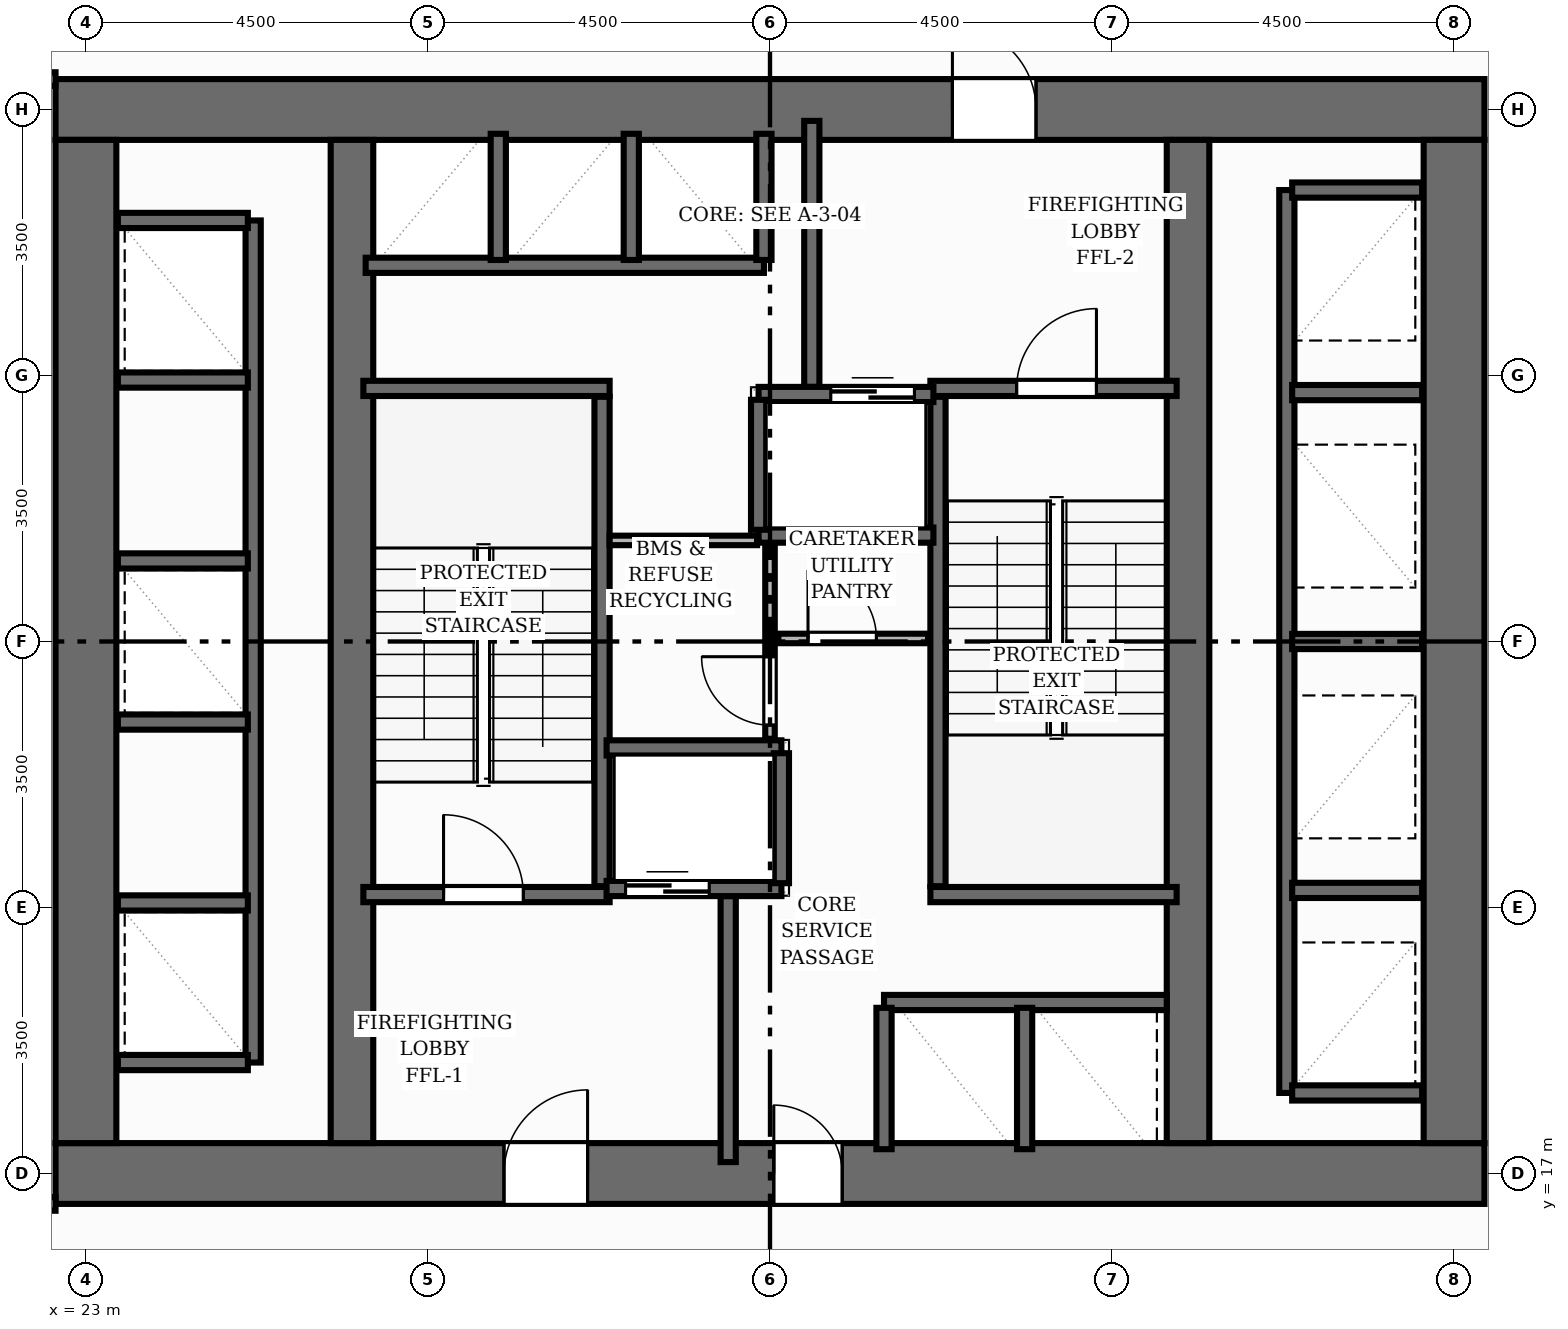
"""IFC4 building model, lengths in metres.
Left out: names, types, materials, properties, quantities, classifications, styles, units other than length and angle.
Written with IfcOpenShell. Run it as: python <this file> out.ifc"""

import sys

from ifc_helpers import new_model, si_unit, direction, frame, frame_2d, origin, place, context, subcontext, project, spatial, rectangle, extrude, element, fill, save


model = new_model("IFC4")
c1 = context("Model", 3, precision=1e-05, world=origin(), true_north=direction((0.0, 1.0)))
c2 = subcontext(c1, "Body", "Model", "MODEL_VIEW")
j1 = project(units=[si_unit("LENGTHUNIT", "METRE"), si_unit("PLANEANGLEUNIT", "RADIAN")], contexts=[c1])
p1 = place(None, origin())
s1 = spatial("IfcSite", under=j1, at=p1, CompositionType="ELEMENT")
p2 = place(p1, origin())
s2 = spatial("IfcBuilding", under=s1, at=p2, CompositionType="ELEMENT")
p3 = place(p2, frame((0.0, 0.0, 12.0)))
s3 = spatial("IfcBuildingStorey", under=s2, at=p3, CompositionType="ELEMENT", Elevation=12.0)
p4 = place(p3, frame((22.6, 17.0, 0.0), z_axis=(0.0, 0.0, 1.0), x_axis=(1.0, 0.0, 0.0)))
e1 = element("IfcWall", 1, at=p4, inside=s3, PredefinedType="SHEAR", context=c2, shape_type="SweptSolid", body=[
    extrude(rectangle(XDim=18.8, YDim=0.8, at=frame_2d((9.4, 0.0))), origin(), (0.0, 0.0, 1.0), 4.0),
])
p5 = place(p4, frame((5.9, 0.0, 0.0)))
e2 = element("IfcOpeningElement", 2, at=p5, cuts=e1, PredefinedType="OPENING", context=c2, shape_type="SweptSolid", body=[
    extrude(rectangle(XDim=1.1, YDim=2.15, at=frame_2d((0.55, 1.075))), frame((0.0, 0.41, 0.0), z_axis=(0.0, -1.0, 0.0), x_axis=(1.0, 0.0, 0.0)), (0.0, 0.0, 1.0), 0.82),
])
p6 = place(p4, frame((9.45, 0.0, 0.0)))
e3 = element("IfcOpeningElement", 3, at=p6, cuts=e1, PredefinedType="OPENING", context=c2, shape_type="SweptSolid", body=[
    extrude(rectangle(XDim=0.9, YDim=2.1, at=frame_2d((0.45, 1.05))), frame((0.0, 0.41, 0.0), z_axis=(0.0, -1.0, 0.0), x_axis=(1.0, 0.0, 0.0)), (0.0, 0.0, 1.0), 0.82),
])
p7 = place(p3, frame((22.6, 31.0, 0.0), z_axis=(0.0, 0.0, 1.0), x_axis=(1.0, 0.0, 0.0)))
e4 = element("IfcWall", 4, at=p7, inside=s3, PredefinedType="SHEAR", context=c2, shape_type="SweptSolid", body=[
    extrude(rectangle(XDim=18.8, YDim=0.8, at=frame_2d((9.4, 0.0))), origin(), (0.0, 0.0, 1.0), 4.0),
])
p8 = place(p7, frame((11.8, 0.0, 0.0)))
e5 = element("IfcOpeningElement", 5, at=p8, cuts=e4, PredefinedType="OPENING", context=c2, shape_type="SweptSolid", body=[
    extrude(rectangle(XDim=1.1, YDim=2.15, at=frame_2d((0.55, 1.075))), frame((0.0, 0.41, 0.0), z_axis=(0.0, -1.0, 0.0), x_axis=(1.0, 0.0, 0.0)), (0.0, 0.0, 1.0), 0.82),
])
for number, where, z_axis, x_axis in (
    (6, (23.0, 17.4, 0.0), (0.0, 0.0, 1.0), (0.0, 1.0, 0.0)),
    (7, (41.0, 17.4, 0.0), (0.0, 0.0, 1.0), (0.0, 1.0, 0.0)),
):
    element("IfcWall", number, at=place(p3, frame(where, z_axis=z_axis, x_axis=x_axis)), inside=s3, PredefinedType="SHEAR", context=c2, shape_type="SweptSolid", body=[
        extrude(rectangle(XDim=13.2, YDim=0.8, at=frame_2d((6.6, 0.0))), origin(), (0.0, 0.0, 1.0), 4.0),
    ])
for number, where, z_axis, x_axis in (
    (8, (26.5, 17.4, 0.0), (0.0, 0.0, 1.0), (0.0, 1.0, 0.0)),
    (9, (37.5, 17.4, 0.0), (0.0, 0.0, 1.0), (0.0, 1.0, 0.0)),
):
    element("IfcWall", number, at=place(p3, frame(where, z_axis=z_axis, x_axis=x_axis)), inside=s3, PredefinedType="SHEAR", context=c2, shape_type="SweptSolid", body=[
        extrude(rectangle(XDim=13.2, YDim=0.56, at=frame_2d((6.6, 0.0))), origin(), (0.0, 0.0, 1.0), 4.0),
    ])
p9 = place(p3, frame((29.79, 20.78, 0.0), z_axis=(0.0, 0.0, 1.0), x_axis=(0.0, 1.0, 0.0)))
e10 = element("IfcWall", 10, at=p9, inside=s3, PredefinedType="SHEAR", context=c2, shape_type="SweptSolid", body=[
    extrude(rectangle(XDim=6.44, YDim=0.2, at=frame_2d((3.22, 0.0))), origin(), (0.0, 0.0, 1.0), 4.0),
])
p10 = place(p3, frame((26.65, 27.33, 0.0), z_axis=(0.0, 0.0, 1.0), x_axis=(1.0, 0.0, 0.0)))
e11 = element("IfcWall", 11, at=p10, inside=s3, PredefinedType="SHEAR", context=c2, shape_type="SweptSolid", body=[
    extrude(rectangle(XDim=3.24, YDim=0.2, at=frame_2d((1.62, 0.0))), origin(), (0.0, 0.0, 1.0), 4.0),
])
p11 = place(p3, frame((26.65, 20.67, 0.0), z_axis=(0.0, 0.0, 1.0), x_axis=(1.0, 0.0, 0.0)))
e12 = element("IfcWall", 12, at=p11, inside=s3, PredefinedType="SHEAR", context=c2, shape_type="SweptSolid", body=[
    extrude(rectangle(XDim=3.24, YDim=0.2, at=frame_2d((1.62, 0.0))), origin(), (0.0, 0.0, 1.0), 4.0),
])
p12 = place(p11, frame((1.055, 0.0, 0.0)))
e13 = element("IfcOpeningElement", 13, at=p12, cuts=e12, PredefinedType="OPENING", context=c2, shape_type="SweptSolid", body=[
    extrude(rectangle(XDim=1.05, YDim=2.15, at=frame_2d((0.525, 1.075))), frame((0.0, 0.11, 0.0), z_axis=(0.0, -1.0, 0.0), x_axis=(1.0, 0.0, 0.0)), (0.0, 0.0, 1.0), 0.22),
])
p13 = place(p3, frame((34.21, 20.78, 0.0), z_axis=(0.0, 0.0, 1.0), x_axis=(0.0, 1.0, 0.0)))
e14 = element("IfcWall", 14, at=p13, inside=s3, PredefinedType="SHEAR", context=c2, shape_type="SweptSolid", body=[
    extrude(rectangle(XDim=6.44, YDim=0.2, at=frame_2d((3.22, 0.0))), origin(), (0.0, 0.0, 1.0), 4.0),
])
p14 = place(p3, frame((34.11, 20.67, 0.0), z_axis=(0.0, 0.0, 1.0), x_axis=(1.0, 0.0, 0.0)))
e15 = element("IfcWall", 15, at=p14, inside=s3, PredefinedType="SHEAR", context=c2, shape_type="SweptSolid", body=[
    extrude(rectangle(XDim=3.24, YDim=0.2, at=frame_2d((1.62, 0.0))), origin(), (0.0, 0.0, 1.0), 4.0),
])
p15 = place(p3, frame((34.11, 27.33, 0.0), z_axis=(0.0, 0.0, 1.0), x_axis=(1.0, 0.0, 0.0)))
e16 = element("IfcWall", 16, at=p15, inside=s3, PredefinedType="SHEAR", context=c2, shape_type="SweptSolid", body=[
    extrude(rectangle(XDim=3.24, YDim=0.2, at=frame_2d((1.62, 0.0))), origin(), (0.0, 0.0, 1.0), 4.0),
])
p16 = place(p15, frame((1.135, 0.0, 0.0)))
e17 = element("IfcOpeningElement", 17, at=p16, cuts=e16, PredefinedType="OPENING", context=c2, shape_type="SweptSolid", body=[
    extrude(rectangle(XDim=1.05, YDim=2.15, at=frame_2d((0.525, 1.075))), frame((0.0, 0.11, 0.0), z_axis=(0.0, -1.0, 0.0), x_axis=(1.0, 0.0, 0.0)), (0.0, 0.0, 1.0), 0.22),
])
for number, where, z_axis, x_axis in (
    (18, (31.45, 17.15, 0.0), (0.0, 0.0, 1.0), (0.0, 1.0, 0.0)),
    (19, (32.55, 27.35, 0.0), (0.0, 0.0, 1.0), (0.0, 1.0, 0.0)),
):
    element("IfcWall", number, at=place(p3, frame(where, z_axis=z_axis, x_axis=x_axis)), inside=s3, PredefinedType="SHEAR", context=c2, shape_type="SweptSolid", body=[
        extrude(rectangle(XDim=3.5, YDim=0.2, at=frame_2d((1.75, 0.0))), origin(), (0.0, 0.0, 1.0), 4.0),
    ])
p17 = place(p3, frame((29.85, 20.75, 0.0), z_axis=(0.0, 0.0, 1.0), x_axis=(1.0, 0.0, 0.0)))
e20 = element("IfcWall", 20, at=p17, inside=s3, PredefinedType="SHEAR", context=c2, shape_type="SweptSolid", body=[
    extrude(rectangle(XDim=2.3, YDim=0.2, at=frame_2d((1.15, 0.0))), origin(), (0.0, 0.0, 1.0), 4.0),
])
p18 = place(p17, frame((0.25, 0.0, 0.0)))
e21 = element("IfcOpeningElement", 21, at=p18, cuts=e20, PredefinedType="OPENING", context=c2, shape_type="SweptSolid", body=[
    extrude(rectangle(XDim=1.1, YDim=2.15, at=frame_2d((0.55, 1.075))), frame((0.0, 0.11, 0.0), z_axis=(0.0, -1.0, 0.0), x_axis=(1.0, 0.0, 0.0)), (0.0, 0.0, 1.0), 0.22),
])
p19 = place(p3, frame((29.85, 22.6, 0.0), z_axis=(0.0, 0.0, 1.0), x_axis=(1.0, 0.0, 0.0)))
e22 = element("IfcWall", 22, at=p19, inside=s3, PredefinedType="SHEAR", context=c2, shape_type="SweptSolid", body=[
    extrude(rectangle(XDim=2.3, YDim=0.2, at=frame_2d((1.15, 0.0))), origin(), (0.0, 0.0, 1.0), 4.0),
])
p20 = place(p3, frame((32.15, 20.82, 0.0), z_axis=(0.0, 0.0, 1.0), x_axis=(0.0, 1.0, 0.0)))
e23 = element("IfcWall", 23, at=p20, inside=s3, PredefinedType="SHEAR", context=c2, shape_type="SweptSolid", body=[
    extrude(rectangle(XDim=1.71, YDim=0.2, at=frame_2d((0.855, 0.0))), origin(), (0.0, 0.0, 1.0), 4.0),
])
p21 = place(p3, frame((31.85, 27.25, 0.0), z_axis=(0.0, 0.0, 1.0), x_axis=(1.0, 0.0, 0.0)))
e24 = element("IfcWall", 24, at=p21, inside=s3, PredefinedType="SHEAR", context=c2, shape_type="SweptSolid", body=[
    extrude(rectangle(XDim=2.3, YDim=0.2, at=frame_2d((1.15, 0.0))), origin(), (0.0, 0.0, 1.0), 4.0),
])
p22 = place(p21, frame((0.95, 0.0, 0.0)))
e25 = element("IfcOpeningElement", 25, at=p22, cuts=e24, PredefinedType="OPENING", context=c2, shape_type="SweptSolid", body=[
    extrude(rectangle(XDim=1.1, YDim=2.15, at=frame_2d((0.55, 1.075))), frame((0.0, 0.11, 0.0), z_axis=(0.0, -1.0, 0.0), x_axis=(1.0, 0.0, 0.0)), (0.0, 0.0, 1.0), 0.22),
])
p23 = place(p3, frame((31.85, 25.4, 0.0), z_axis=(0.0, 0.0, 1.0), x_axis=(1.0, 0.0, 0.0)))
e26 = element("IfcWall", 26, at=p23, inside=s3, PredefinedType="SHEAR", context=c2, shape_type="SweptSolid", body=[
    extrude(rectangle(XDim=2.3, YDim=0.2, at=frame_2d((1.15, 0.0))), origin(), (0.0, 0.0, 1.0), 4.0),
])
p24 = place(p3, frame((31.85, 25.47, 0.0), z_axis=(0.0, 0.0, 1.0), x_axis=(0.0, 1.0, 0.0)))
e27 = element("IfcWall", 27, at=p24, inside=s3, PredefinedType="SHEAR", context=c2, shape_type="SweptSolid", body=[
    extrude(rectangle(XDim=1.71, YDim=0.2, at=frame_2d((0.855, 0.0))), origin(), (0.0, 0.0, 1.0), 4.0),
])
p25 = place(p3, frame((38.8, 18.06, 0.0), z_axis=(0.0, 0.0, 1.0), x_axis=(0.0, 1.0, 0.0)))
e28 = element("IfcWall", 28, at=p25, inside=s3, PredefinedType="SHEAR", context=c2, shape_type="SweptSolid", body=[
    extrude(rectangle(XDim=11.88, YDim=0.2, at=frame_2d((5.94, 0.0))), origin(), (0.0, 0.0, 1.0), 4.0),
])
for number, where, z_axis, x_axis in (
    (29, (38.87, 18.06, 0.0), (0.0, 0.0, 1.0), (1.0, 0.0, 0.0)),
    (30, (38.87, 29.94, 0.0), (0.0, 0.0, 1.0), (1.0, 0.0, 0.0)),
    (31, (38.87, 20.725, 0.0), (0.0, 0.0, 1.0), (1.0, 0.0, 0.0)),
    (32, (38.87, 24.0, 0.0), (0.0, 0.0, 1.0), (1.0, 0.0, 0.0)),
    (33, (38.87, 27.275, 0.0), (0.0, 0.0, 1.0), (1.0, 0.0, 0.0)),
):
    element("IfcWall", number, at=place(p3, frame(where, z_axis=z_axis, x_axis=x_axis)), inside=s3, PredefinedType="SHEAR", context=c2, shape_type="SweptSolid", body=[
        extrude(rectangle(XDim=1.71, YDim=0.2, at=frame_2d((0.855, 0.0))), origin(), (0.0, 0.0, 1.0), 4.0),
    ])
p26 = place(p3, frame((25.2, 18.46, 0.0), z_axis=(0.0, 0.0, 1.0), x_axis=(0.0, 1.0, 0.0)))
e34 = element("IfcWall", 34, at=p26, inside=s3, PredefinedType="SHEAR", context=c2, shape_type="SweptSolid", body=[
    extrude(rectangle(XDim=11.08, YDim=0.2, at=frame_2d((5.54, 0.0))), origin(), (0.0, 0.0, 1.0), 4.0),
])
for number, where, z_axis, x_axis in (
    (35, (23.42, 18.46, 0.0), (0.0, 0.0, 1.0), (1.0, 0.0, 0.0)),
    (36, (23.42, 29.54, 0.0), (0.0, 0.0, 1.0), (1.0, 0.0, 0.0)),
    (37, (23.42, 20.56, 0.0), (0.0, 0.0, 1.0), (1.0, 0.0, 0.0)),
    (38, (23.42, 22.94, 0.0), (0.0, 0.0, 1.0), (1.0, 0.0, 0.0)),
    (39, (23.42, 25.06, 0.0), (0.0, 0.0, 1.0), (1.0, 0.0, 0.0)),
    (40, (23.42, 27.44, 0.0), (0.0, 0.0, 1.0), (1.0, 0.0, 0.0)),
):
    element("IfcWall", number, at=place(p3, frame(where, z_axis=z_axis, x_axis=x_axis)), inside=s3, PredefinedType="SHEAR", context=c2, shape_type="SweptSolid", body=[
        extrude(rectangle(XDim=1.71, YDim=0.2, at=frame_2d((0.855, 0.0))), origin(), (0.0, 0.0, 1.0), 4.0),
    ])
p27 = place(p3, frame((26.68, 28.95, 0.0), z_axis=(0.0, 0.0, 1.0), x_axis=(1.0, 0.0, 0.0)))
e41 = element("IfcWall", 41, at=p27, inside=s3, PredefinedType="SHEAR", context=c2, shape_type="SweptSolid", body=[
    extrude(rectangle(XDim=5.24, YDim=0.2, at=frame_2d((2.62, 0.0))), origin(), (0.0, 0.0, 1.0), 4.0),
])
for number, where, z_axis, x_axis in (
    (42, (31.92, 29.02, 0.0), (0.0, 0.0, 1.0), (0.0, 1.0, 0.0)),
    (43, (28.425, 29.02, 0.0), (0.0, 0.0, 1.0), (0.0, 1.0, 0.0)),
    (44, (30.175, 29.02, 0.0), (0.0, 0.0, 1.0), (0.0, 1.0, 0.0)),
):
    element("IfcWall", number, at=place(p3, frame(where, z_axis=z_axis, x_axis=x_axis)), inside=s3, PredefinedType="SHEAR", context=c2, shape_type="SweptSolid", body=[
        extrude(rectangle(XDim=1.66, YDim=0.2, at=frame_2d((0.83, 0.0))), origin(), (0.0, 0.0, 1.0), 4.0),
    ])
p28 = place(p3, frame((33.5, 19.25, 0.0), z_axis=(0.0, 0.0, 1.0), x_axis=(1.0, 0.0, 0.0)))
e45 = element("IfcWall", 45, at=p28, inside=s3, PredefinedType="SHEAR", context=c2, shape_type="SweptSolid", body=[
    extrude(rectangle(XDim=3.72, YDim=0.2, at=frame_2d((1.86, 0.0))), origin(), (0.0, 0.0, 1.0), 4.0),
])
for number, where, z_axis, x_axis in (
    (46, (33.5, 17.32, 0.0), (0.0, 0.0, 1.0), (0.0, 1.0, 0.0)),
    (47, (35.35, 17.32, 0.0), (0.0, 0.0, 1.0), (0.0, 1.0, 0.0)),
):
    element("IfcWall", number, at=place(p3, frame(where, z_axis=z_axis, x_axis=x_axis)), inside=s3, PredefinedType="SHEAR", context=c2, shape_type="SweptSolid", body=[
        extrude(rectangle(XDim=1.86, YDim=0.2, at=frame_2d((0.93, 0.0))), origin(), (0.0, 0.0, 1.0), 4.0),
    ])
p29 = place(p3, frame((32.0, 22.72, 0.0), z_axis=(0.0, 0.0, 1.0), x_axis=(0.0, 1.0, 0.0)))
e48 = element("IfcWall", 48, at=p29, inside=s3, PredefinedType="PARTITIONING", context=c2, shape_type="SweptSolid", body=[
    extrude(rectangle(XDim=2.52, YDim=0.125, at=frame_2d((1.26, 0.0))), origin(), (0.0, 0.0, 1.0), 3.715),
])
p30 = place(p29, frame((0.18, 0.0, 0.0)))
e49 = element("IfcOpeningElement", 49, at=p30, cuts=e48, PredefinedType="OPENING", context=c2, shape_type="SweptSolid", body=[
    extrude(rectangle(XDim=0.9, YDim=2.1, at=frame_2d((0.45, 1.05))), frame((0.0, 0.073, 0.0), z_axis=(0.0, -1.0, 0.0), x_axis=(1.0, 0.0, 0.0)), (0.0, 0.0, 1.0), 0.145),
])
p31 = place(p3, frame((32.11, 24.04, 0.0), z_axis=(0.0, 0.0, 1.0), x_axis=(1.0, 0.0, 0.0)))
e50 = element("IfcWall", 50, at=p31, inside=s3, PredefinedType="PARTITIONING", context=c2, shape_type="SweptSolid", body=[
    extrude(rectangle(XDim=1.97, YDim=0.125, at=frame_2d((0.985, 0.0))), origin(), (0.0, 0.0, 1.0), 3.715),
])
p32 = place(p31, frame((0.39, 0.0, 0.0)))
e51 = element("IfcOpeningElement", 51, at=p32, cuts=e50, PredefinedType="OPENING", context=c2, shape_type="SweptSolid", body=[
    extrude(rectangle(XDim=0.9, YDim=2.1, at=frame_2d((0.45, 1.05))), frame((0.0, 0.073, 0.0), z_axis=(0.0, -1.0, 0.0), x_axis=(1.0, 0.0, 0.0)), (0.0, 0.0, 1.0), 0.145),
])
p33 = place(p3, frame((29.89, 25.33, 0.0), z_axis=(0.0, 0.0, 1.0), x_axis=(1.0, 0.0, 0.0)))
e52 = element("IfcWall", 52, at=p33, inside=s3, PredefinedType="PARTITIONING", context=c2, shape_type="SweptSolid", body=[
    extrude(rectangle(XDim=1.94, YDim=0.125, at=frame_2d((0.97, 0.0))), origin(), (0.0, 0.0, 1.0), 3.715),
])
p34 = place(p3, frame((22.6, 31.4, 0.0), z_axis=(0.0, 0.0, 1.0), x_axis=(-1.0, 0.0, 0.0)))
e53 = element("IfcWall", 53, at=p34, inside=s3, PredefinedType="PARTITIONING", context=c2, shape_type="SweptSolid", body=[
    extrude(rectangle(XDim=2.77, YDim=0.18, at=frame_2d((1.385, 0.0))), origin(), (0.0, 0.0, 1.0), 3.715),
])
p35 = place(p34, frame((0.86, 0.0, 0.0)))
e54 = element("IfcOpeningElement", 54, at=p35, cuts=e53, PredefinedType="OPENING", context=c2, shape_type="SweptSolid", body=[
    extrude(rectangle(XDim=1.05, YDim=2.15, at=frame_2d((0.525, 1.075))), frame((0.0, 0.1, 0.0), z_axis=(0.0, -1.0, 0.0), x_axis=(1.0, 0.0, 0.0)), (0.0, 0.0, 1.0), 0.2),
])
p36 = place(p3, frame((19.83, 16.6, 0.0), z_axis=(0.0, 0.0, 1.0), x_axis=(1.0, 0.0, 0.0)))
e55 = element("IfcWall", 55, at=p36, inside=s3, PredefinedType="PARTITIONING", context=c2, shape_type="SweptSolid", body=[
    extrude(rectangle(XDim=2.77, YDim=0.18, at=frame_2d((1.385, 0.0))), origin(), (0.0, 0.0, 1.0), 3.008),
])
p37 = place(p12, origin())
e56 = element("IfcDoor", 56, at=p37, inside=s3, OperationType="SINGLE_SWING_LEFT", PredefinedType="DOOR", context=c2, shape_type="SweptSolid", body=[
    extrude(rectangle(XDim=1.05, YDim=2.15, at=frame_2d((0.525, 1.075))), frame((0.0, 0.025, 0.0), z_axis=(0.0, -1.0, 0.0), x_axis=(1.0, 0.0, 0.0)), (0.0, 0.0, 1.0), 0.05),
])
fill(e13, e56)
p38 = place(p16, origin())
e57 = element("IfcDoor", 57, at=p38, inside=s3, OperationType="SINGLE_SWING_RIGHT", PredefinedType="DOOR", context=c2, shape_type="SweptSolid", body=[
    extrude(rectangle(XDim=1.05, YDim=2.15, at=frame_2d((0.525, 1.075))), frame((0.0, 0.025, 0.0), z_axis=(0.0, -1.0, 0.0), x_axis=(1.0, 0.0, 0.0)), (0.0, 0.0, 1.0), 0.05),
])
fill(e17, e57)
p39 = place(p5, origin())
e58 = element("IfcDoor", 58, at=p39, inside=s3, OperationType="SINGLE_SWING_RIGHT", PredefinedType="DOOR", context=c2, shape_type="SweptSolid", body=[
    extrude(rectangle(XDim=1.1, YDim=2.15, at=frame_2d((0.55, 1.075))), frame((0.0, 0.025, 0.0), z_axis=(0.0, -1.0, 0.0), x_axis=(1.0, 0.0, 0.0)), (0.0, 0.0, 1.0), 0.05),
])
fill(e2, e58)
p40 = place(p8, origin())
e59 = element("IfcDoor", 59, at=p40, inside=s3, OperationType="SINGLE_SWING_LEFT", PredefinedType="DOOR", context=c2, shape_type="SweptSolid", body=[
    extrude(rectangle(XDim=1.1, YDim=2.15, at=frame_2d((0.55, 1.075))), frame((0.0, 0.025, 0.0), z_axis=(0.0, -1.0, 0.0), x_axis=(1.0, 0.0, 0.0)), (0.0, 0.0, 1.0), 0.05),
])
fill(e5, e59)
p41 = place(p18, origin())
e60 = element("IfcDoor", 60, at=p41, inside=s3, OperationType="DOUBLE_DOOR_SLIDING", PredefinedType="DOOR", context=c2, shape_type="SweptSolid", body=[
    extrude(rectangle(XDim=1.1, YDim=2.15, at=frame_2d((0.55, 1.075))), frame((0.0, 0.025, 0.0), z_axis=(0.0, -1.0, 0.0), x_axis=(1.0, 0.0, 0.0)), (0.0, 0.0, 1.0), 0.05),
])
fill(e21, e60)
p42 = place(p22, origin())
e61 = element("IfcDoor", 61, at=p42, inside=s3, OperationType="DOUBLE_DOOR_SLIDING", PredefinedType="DOOR", context=c2, shape_type="SweptSolid", body=[
    extrude(rectangle(XDim=1.1, YDim=2.15, at=frame_2d((0.55, 1.075))), frame((0.0, 0.025, 0.0), z_axis=(0.0, -1.0, 0.0), x_axis=(1.0, 0.0, 0.0)), (0.0, 0.0, 1.0), 0.05),
])
fill(e25, e61)
p43 = place(p6, origin())
e62 = element("IfcDoor", 62, at=p43, inside=s3, OperationType="SINGLE_SWING_LEFT", PredefinedType="DOOR", context=c2, shape_type="SweptSolid", body=[
    extrude(rectangle(XDim=0.9, YDim=2.1, at=frame_2d((0.45, 1.05))), frame((0.0, 0.025, 0.0), z_axis=(0.0, -1.0, 0.0), x_axis=(1.0, 0.0, 0.0)), (0.0, 0.0, 1.0), 0.05),
])
fill(e3, e62)
p44 = place(p32, origin())
e63 = element("IfcDoor", 63, at=p44, inside=s3, OperationType="SINGLE_SWING_LEFT", PredefinedType="DOOR", context=c2, shape_type="SweptSolid", body=[
    extrude(rectangle(XDim=0.9, YDim=2.1, at=frame_2d((0.45, 1.05))), frame((0.0, 0.025, 0.0), z_axis=(0.0, -1.0, 0.0), x_axis=(1.0, 0.0, 0.0)), (0.0, 0.0, 1.0), 0.05),
])
fill(e51, e63)
p45 = place(p30, origin())
e64 = element("IfcDoor", 64, at=p45, inside=s3, OperationType="SINGLE_SWING_RIGHT", PredefinedType="DOOR", context=c2, shape_type="SweptSolid", body=[
    extrude(rectangle(XDim=0.9, YDim=2.1, at=frame_2d((0.45, 1.05))), frame((0.0, 0.025, 0.0), z_axis=(0.0, -1.0, 0.0), x_axis=(1.0, 0.0, 0.0)), (0.0, 0.0, 1.0), 0.05),
])
fill(e49, e64)
save(model, sys.argv[1])
